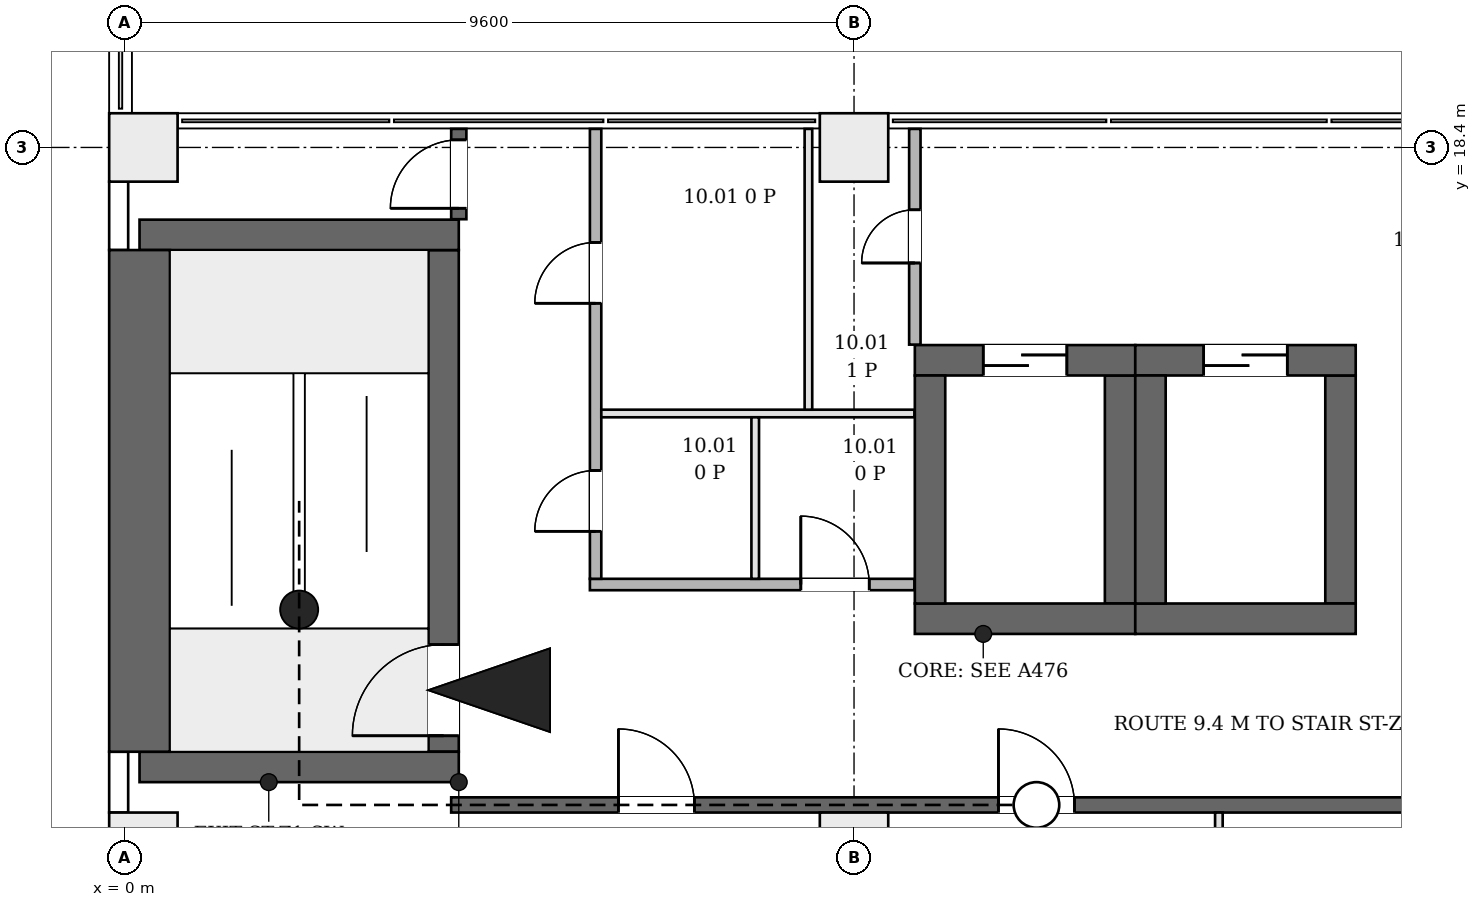
"""IFC4 building model, lengths in metres.
Left out: names, types, materials, properties, quantities, classifications, styles, units other than length and angle.
Written with IfcOpenShell. Run it as: python <this file> out.ifc"""

import sys

from ifc_helpers import new_model, si_unit, direction, frame, frame_2d, origin, origin_2d, place, context, subcontext, project, spatial, rectangle, extrude, element, fill, save


model = new_model("IFC4")
c1 = context("Model", 3, precision=1e-05, world=origin(), true_north=direction((0.0, 1.0)))
c2 = subcontext(c1, "Body", "Model", "MODEL_VIEW")
j1 = project(units=[si_unit("LENGTHUNIT", "METRE"), si_unit("PLANEANGLEUNIT", "RADIAN")], contexts=[c1])
p1 = place(None, origin())
s1 = spatial("IfcSite", under=j1, at=p1, CompositionType="ELEMENT")
p2 = place(p1, origin())
s2 = spatial("IfcBuilding", under=s1, at=p2, CompositionType="ELEMENT")
p3 = place(p2, frame((0.0, 0.0, 52.9)))
s3 = spatial("IfcBuildingStorey", under=s2, at=p3, CompositionType="ELEMENT", Elevation=52.9)
for number, where, z_axis, x_axis in (
    (1, (0.2, 10.25, 0.0), (0.0, 0.0, 1.0), (1.0, 0.0, 0.0)),
    (2, (0.2, 17.25, 0.0), (0.0, 0.0, 1.0), (1.0, 0.0, 0.0)),
):
    element("IfcWall", number, at=place(p3, frame(where, z_axis=z_axis, x_axis=x_axis)), inside=s3, PredefinedType="SHEAR", context=c2, shape_type="SweptSolid", body=[
        extrude(rectangle(XDim=4.2, YDim=0.4, at=frame_2d((2.1, 0.0))), origin(), (0.0, 0.0, 1.0), 4.2),
    ])
p4 = place(p3, frame((0.2, 10.45, 0.0), z_axis=(0.0, 0.0, 1.0), x_axis=(0.0, 1.0, 0.0)))
e3 = element("IfcWall", 3, at=p4, inside=s3, PredefinedType="SHEAR", context=c2, shape_type="SweptSolid", body=[
    extrude(rectangle(XDim=6.6, YDim=0.8, at=frame_2d((3.3, 0.0))), origin(), (0.0, 0.0, 1.0), 4.2),
])
p5 = place(p3, frame((4.2, 10.45, 0.0), z_axis=(0.0, 0.0, 1.0), x_axis=(0.0, 1.0, 0.0)))
e4 = element("IfcWall", 4, at=p5, inside=s3, PredefinedType="SHEAR", context=c2, shape_type="SweptSolid", body=[
    extrude(rectangle(XDim=6.6, YDim=0.4, at=frame_2d((3.3, 0.0))), origin(), (0.0, 0.0, 1.0), 4.2),
])
p6 = place(p5, frame((0.21, 0.0, 0.0)))
e5 = element("IfcOpeningElement", 5, at=p6, cuts=e4, PredefinedType="OPENING", context=c2, shape_type="SweptSolid", body=[
    extrude(rectangle(XDim=1.2, YDim=2.1, at=frame_2d((0.6, 1.05))), frame((0.0, 0.21, 0.0), z_axis=(0.0, -1.0, 0.0), x_axis=(1.0, 0.0, 0.0)), (0.0, 0.0, 1.0), 0.42),
])
p7 = place(p3, frame((10.4, 12.2, 0.0), z_axis=(0.0, 0.0, 1.0), x_axis=(1.0, 0.0, 0.0)))
e6 = element("IfcWall", 6, at=p7, inside=s3, PredefinedType="SHEAR", context=c2, shape_type="SweptSolid", body=[
    extrude(rectangle(XDim=2.9, YDim=0.4, at=frame_2d((1.45, 0.0))), origin(), (0.0, 0.0, 1.0), 4.2),
])
p8 = place(p3, frame((10.4, 15.6, 0.0), z_axis=(0.0, 0.0, 1.0), x_axis=(1.0, 0.0, 0.0)))
e7 = element("IfcWall", 7, at=p8, inside=s3, PredefinedType="SHEAR", context=c2, shape_type="SweptSolid", body=[
    extrude(rectangle(XDim=2.9, YDim=0.4, at=frame_2d((1.45, 0.0))), origin(), (0.0, 0.0, 1.0), 4.2),
])
p9 = place(p8, frame((0.9, 0.0, 0.0)))
e8 = element("IfcOpeningElement", 8, at=p9, cuts=e7, PredefinedType="OPENING", context=c2, shape_type="SweptSolid", body=[
    extrude(rectangle(XDim=1.1, YDim=2.1, at=frame_2d((0.55, 1.05))), frame((0.0, 0.21, 0.0), z_axis=(0.0, -1.0, 0.0), x_axis=(1.0, 0.0, 0.0)), (0.0, 0.0, 1.0), 0.42),
])
for number, where, z_axis, x_axis in (
    (9, (10.6, 12.4, 0.0), (0.0, 0.0, 1.0), (0.0, 1.0, 0.0)),
    (10, (13.1, 12.4, 0.0), (0.0, 0.0, 1.0), (0.0, 1.0, 0.0)),
):
    element("IfcWall", number, at=place(p3, frame(where, z_axis=z_axis, x_axis=x_axis)), inside=s3, PredefinedType="SHEAR", context=c2, shape_type="SweptSolid", body=[
        extrude(rectangle(XDim=3.0, YDim=0.4, at=frame_2d((1.5, 0.0))), origin(), (0.0, 0.0, 1.0), 4.2),
    ])
p10 = place(p3, frame((13.3, 12.2, 0.0), z_axis=(0.0, 0.0, 1.0), x_axis=(1.0, 0.0, 0.0)))
e11 = element("IfcWall", 11, at=p10, inside=s3, PredefinedType="SHEAR", context=c2, shape_type="SweptSolid", body=[
    extrude(rectangle(XDim=2.9, YDim=0.4, at=frame_2d((1.45, 0.0))), origin(), (0.0, 0.0, 1.0), 4.2),
])
p11 = place(p3, frame((13.3, 15.6, 0.0), z_axis=(0.0, 0.0, 1.0), x_axis=(1.0, 0.0, 0.0)))
e12 = element("IfcWall", 12, at=p11, inside=s3, PredefinedType="SHEAR", context=c2, shape_type="SweptSolid", body=[
    extrude(rectangle(XDim=2.9, YDim=0.4, at=frame_2d((1.45, 0.0))), origin(), (0.0, 0.0, 1.0), 4.2),
])
p12 = place(p11, frame((0.9, 0.0, 0.0)))
e13 = element("IfcOpeningElement", 13, at=p12, cuts=e12, PredefinedType="OPENING", context=c2, shape_type="SweptSolid", body=[
    extrude(rectangle(XDim=1.1, YDim=2.1, at=frame_2d((0.55, 1.05))), frame((0.0, 0.21, 0.0), z_axis=(0.0, -1.0, 0.0), x_axis=(1.0, 0.0, 0.0)), (0.0, 0.0, 1.0), 0.42),
])
for number, where, z_axis, x_axis in (
    (14, (13.5, 12.4, 0.0), (0.0, 0.0, 1.0), (0.0, 1.0, 0.0)),
    (15, (16.0, 12.4, 0.0), (0.0, 0.0, 1.0), (0.0, 1.0, 0.0)),
):
    element("IfcWall", number, at=place(p3, frame(where, z_axis=z_axis, x_axis=x_axis)), inside=s3, PredefinedType="SHEAR", context=c2, shape_type="SweptSolid", body=[
        extrude(rectangle(XDim=3.0, YDim=0.4, at=frame_2d((1.5, 0.0))), origin(), (0.0, 0.0, 1.0), 4.2),
    ])
for number, where, z_axis, x_axis in (
    (16, (0.25, 9.2, 0.0), (0.0, 0.0, 1.0), (1.0, 0.0, 0.0)),
    (17, (9.6, 9.2, 0.0), (0.0, 0.0, 1.0), (1.0, 0.0, 0.0)),
    (18, (0.25, 18.4, 0.0), (0.0, 0.0, 1.0), (1.0, 0.0, 0.0)),
    (19, (9.6, 18.4, 0.0), (0.0, 0.0, 1.0), (1.0, 0.0, 0.0)),
):
    element("IfcColumn", number, at=place(p3, frame(where, z_axis=z_axis, x_axis=x_axis)), inside=s3, PredefinedType="COLUMN", context=c2, shape_type="SweptSolid", body=[
        extrude(rectangle(XDim=0.9, YDim=0.9, at=origin_2d()), origin(), (0.0, 0.0, 1.0), 4.2),
    ])
p13 = place(p3, frame((-0.074, 10.45, 0.0), z_axis=(0.0, 0.0, 1.0), x_axis=(0.0, -1.0, 0.0)))
e20 = element("IfcWall", 20, at=p13, inside=s3, PredefinedType="ELEMENTEDWALL", context=c2, shape_type="SweptSolid", body=[
    extrude(rectangle(XDim=0.8, YDim=0.25, at=frame_2d((0.4, 0.0))), origin(), (0.0, 0.0, 1.0), 3.9),
])
p14 = place(p3, frame((-0.074, 17.95, 0.0), z_axis=(0.0, 0.0, 1.0), x_axis=(0.0, -1.0, 0.0)))
e21 = element("IfcWall", 21, at=p14, inside=s3, PredefinedType="ELEMENTEDWALL", context=c2, shape_type="SweptSolid", body=[
    extrude(rectangle(XDim=0.9, YDim=0.25, at=frame_2d((0.45, 0.0))), origin(), (0.0, 0.0, 1.0), 3.9),
])
p15 = place(p3, frame((4.3, 9.75, 0.0), z_axis=(0.0, 0.0, 1.0), x_axis=(1.0, 0.0, 0.0)))
e22 = element("IfcWall", 22, at=p15, inside=s3, PredefinedType="PARTITIONING", context=c2, shape_type="SweptSolid", body=[
    extrude(rectangle(XDim=43.894, YDim=0.2, at=frame_2d((21.947, 0.0))), origin(), (0.0, 0.0, 1.0), 3.9),
])
p16 = place(p15, frame((2.2, 0.0, 0.0)))
e23 = element("IfcOpeningElement", 23, at=p16, cuts=e22, PredefinedType="OPENING", context=c2, shape_type="SweptSolid", body=[
    extrude(rectangle(XDim=1.0, YDim=2.1, at=frame_2d((0.5, 1.05))), frame((0.0, 0.11, 0.0), z_axis=(0.0, -1.0, 0.0), x_axis=(1.0, 0.0, 0.0)), (0.0, 0.0, 1.0), 0.22),
])
p17 = place(p15, frame((7.2, 0.0, 0.0)))
e24 = element("IfcOpeningElement", 24, at=p17, cuts=e22, PredefinedType="OPENING", context=c2, shape_type="SweptSolid", body=[
    extrude(rectangle(XDim=1.0, YDim=2.1, at=frame_2d((0.5, 1.05))), frame((0.0, 0.11, 0.0), z_axis=(0.0, -1.0, 0.0), x_axis=(1.0, 0.0, 0.0)), (0.0, 0.0, 1.0), 0.22),
])
p18 = place(p15, frame((16.8, 0.0, 0.0)))
e25 = element("IfcOpeningElement", 25, at=p18, cuts=e22, PredefinedType="OPENING", context=c2, shape_type="SweptSolid", body=[
    extrude(rectangle(XDim=1.0, YDim=2.1, at=frame_2d((0.5, 1.05))), frame((0.0, 0.11, 0.0), z_axis=(0.0, -1.0, 0.0), x_axis=(1.0, 0.0, 0.0)), (0.0, 0.0, 1.0), 0.22),
])
p19 = place(p15, frame((28.8, 0.0, 0.0)))
e26 = element("IfcOpeningElement", 26, at=p19, cuts=e22, PredefinedType="OPENING", context=c2, shape_type="SweptSolid", body=[
    extrude(rectangle(XDim=1.0, YDim=2.1, at=frame_2d((0.5, 1.05))), frame((0.0, 0.11, 0.0), z_axis=(0.0, -1.0, 0.0), x_axis=(1.0, 0.0, 0.0)), (0.0, 0.0, 1.0), 0.22),
])
p20 = place(p15, frame((38.25, 0.0, 0.0)))
e27 = element("IfcOpeningElement", 27, at=p20, cuts=e22, PredefinedType="OPENING", context=c2, shape_type="SweptSolid", body=[
    extrude(rectangle(XDim=1.5, YDim=2.1, at=frame_2d((0.75, 1.05))), frame((0.0, 0.11, 0.0), z_axis=(0.0, -1.0, 0.0), x_axis=(1.0, 0.0, 0.0)), (0.0, 0.0, 1.0), 0.22),
])
p21 = place(p3, frame((4.4, 17.456, 0.0), z_axis=(0.0, 0.0, 1.0), x_axis=(0.0, 1.0, 0.0)))
e28 = element("IfcWall", 28, at=p21, inside=s3, PredefinedType="PARTITIONING", context=c2, shape_type="SweptSolid", body=[
    extrude(rectangle(XDim=1.188, YDim=0.2, at=frame_2d((0.594, 0.0))), origin(), (0.0, 0.0, 1.0), 3.9),
])
p22 = place(p21, frame((0.144, 0.0, 0.0)))
e29 = element("IfcOpeningElement", 29, at=p22, cuts=e28, PredefinedType="OPENING", context=c2, shape_type="SweptSolid", body=[
    extrude(rectangle(XDim=0.9, YDim=2.1, at=frame_2d((0.45, 1.05))), frame((0.0, 0.11, 0.0), z_axis=(0.0, -1.0, 0.0), x_axis=(1.0, 0.0, 0.0)), (0.0, 0.0, 1.0), 0.22),
])
p23 = place(p3, frame((6.125, 12.65, 0.0), z_axis=(0.0, 0.0, 1.0), x_axis=(1.0, 0.0, 0.0)))
e30 = element("IfcWall", 30, at=p23, inside=s3, PredefinedType="PARTITIONING", context=c2, shape_type="SweptSolid", body=[
    extrude(rectangle(XDim=4.269, YDim=0.15, at=frame_2d((2.135, 0.0))), origin(), (0.0, 0.0, 1.0), 3.9),
])
p24 = place(p23, frame((2.775, 0.0, 0.0)))
e31 = element("IfcOpeningElement", 31, at=p24, cuts=e30, PredefinedType="OPENING", context=c2, shape_type="SweptSolid", body=[
    extrude(rectangle(XDim=0.9, YDim=2.1, at=frame_2d((0.45, 1.05))), frame((0.0, 0.085, 0.0), z_axis=(0.0, -1.0, 0.0), x_axis=(1.0, 0.0, 0.0)), (0.0, 0.0, 1.0), 0.17),
])
p25 = place(p3, frame((6.2, 12.725, 0.0), z_axis=(0.0, 0.0, 1.0), x_axis=(0.0, 1.0, 0.0)))
e32 = element("IfcWall", 32, at=p25, inside=s3, PredefinedType="PARTITIONING", context=c2, shape_type="SweptSolid", body=[
    extrude(rectangle(XDim=5.919, YDim=0.15, at=frame_2d((2.959, 0.0))), origin(), (0.0, 0.0, 1.0), 3.9),
])
p26 = place(p25, frame((0.625, 0.0, 0.0)))
e33 = element("IfcOpeningElement", 33, at=p26, cuts=e32, PredefinedType="OPENING", context=c2, shape_type="SweptSolid", body=[
    extrude(rectangle(XDim=0.8, YDim=2.1, at=frame_2d((0.4, 1.05))), frame((0.0, 0.085, 0.0), z_axis=(0.0, -1.0, 0.0), x_axis=(1.0, 0.0, 0.0)), (0.0, 0.0, 1.0), 0.17),
])
p27 = place(p25, frame((3.625, 0.0, 0.0)))
e34 = element("IfcOpeningElement", 34, at=p27, cuts=e32, PredefinedType="OPENING", context=c2, shape_type="SweptSolid", body=[
    extrude(rectangle(XDim=0.8, YDim=2.1, at=frame_2d((0.4, 1.05))), frame((0.0, 0.085, 0.0), z_axis=(0.0, -1.0, 0.0), x_axis=(1.0, 0.0, 0.0)), (0.0, 0.0, 1.0), 0.17),
])
p28 = place(p3, frame((6.275, 14.9, 0.0), z_axis=(0.0, 0.0, 1.0), x_axis=(1.0, 0.0, 0.0)))
e35 = element("IfcWall", 35, at=p28, inside=s3, PredefinedType="PARTITIONING", context=c2, shape_type="SweptSolid", body=[
    extrude(rectangle(XDim=4.119, YDim=0.1, at=frame_2d((2.06, 0.0))), origin(), (0.0, 0.0, 1.0), 3.9),
])
p29 = place(p3, frame((8.3, 12.725, 0.0), z_axis=(0.0, 0.0, 1.0), x_axis=(0.0, 1.0, 0.0)))
e36 = element("IfcWall", 36, at=p29, inside=s3, PredefinedType="PARTITIONING", context=c2, shape_type="SweptSolid", body=[
    extrude(rectangle(XDim=2.125, YDim=0.1, at=frame_2d((1.062, 0.0))), origin(), (0.0, 0.0, 1.0), 3.9),
])
p30 = place(p3, frame((9.0, 14.95, 0.0), z_axis=(0.0, 0.0, 1.0), x_axis=(0.0, 1.0, 0.0)))
e37 = element("IfcWall", 37, at=p30, inside=s3, PredefinedType="PARTITIONING", context=c2, shape_type="SweptSolid", body=[
    extrude(rectangle(XDim=3.694, YDim=0.1, at=frame_2d((1.847, 0.0))), origin(), (0.0, 0.0, 1.0), 3.9),
])
p31 = place(p3, frame((10.4, 15.806, 0.0), z_axis=(0.0, 0.0, 1.0), x_axis=(0.0, 1.0, 0.0)))
e38 = element("IfcWall", 38, at=p31, inside=s3, PredefinedType="PARTITIONING", context=c2, shape_type="SweptSolid", body=[
    extrude(rectangle(XDim=2.838, YDim=0.15, at=frame_2d((1.419, 0.0))), origin(), (0.0, 0.0, 1.0), 3.9),
])
p32 = place(p31, frame((1.074, 0.0, 0.0)))
e39 = element("IfcOpeningElement", 39, at=p32, cuts=e38, PredefinedType="OPENING", context=c2, shape_type="SweptSolid", body=[
    extrude(rectangle(XDim=0.7, YDim=2.1, at=frame_2d((0.35, 1.05))), frame((0.0, 0.085, 0.0), z_axis=(0.0, -1.0, 0.0), x_axis=(1.0, 0.0, 0.0)), (0.0, 0.0, 1.0), 0.17),
])
p33 = place(p3, frame((14.4, 0.006, 0.0), z_axis=(0.0, 0.0, 1.0), x_axis=(0.0, 1.0, 0.0)))
e40 = element("IfcWall", 40, at=p33, inside=s3, PredefinedType="PARTITIONING", context=c2, shape_type="SweptSolid", body=[
    extrude(rectangle(XDim=9.644, YDim=0.1, at=frame_2d((4.822, 0.0))), origin(), (0.0, 0.0, 1.0), 3.9),
])
p34 = place(p6, origin())
e41 = element("IfcDoor", 41, at=p34, inside=s3, OperationType="SINGLE_SWING_RIGHT", PredefinedType="DOOR", context=c2, shape_type="SweptSolid", body=[
    extrude(rectangle(XDim=1.2, YDim=2.1, at=frame_2d((0.6, 1.05))), frame((0.0, 0.025, 0.0), z_axis=(0.0, -1.0, 0.0), x_axis=(1.0, 0.0, 0.0)), (0.0, 0.0, 1.0), 0.05),
])
fill(e5, e41)
p35 = place(p9, origin())
e42 = element("IfcDoor", 42, at=p35, inside=s3, OperationType="DOUBLE_DOOR_SLIDING", PredefinedType="DOOR", context=c2, shape_type="SweptSolid", body=[
    extrude(rectangle(XDim=1.1, YDim=2.1, at=frame_2d((0.55, 1.05))), frame((0.0, 0.025, 0.0), z_axis=(0.0, -1.0, 0.0), x_axis=(1.0, 0.0, 0.0)), (0.0, 0.0, 1.0), 0.05),
])
fill(e8, e42)
p36 = place(p12, origin())
e43 = element("IfcDoor", 43, at=p36, inside=s3, OperationType="DOUBLE_DOOR_SLIDING", PredefinedType="DOOR", context=c2, shape_type="SweptSolid", body=[
    extrude(rectangle(XDim=1.1, YDim=2.1, at=frame_2d((0.55, 1.05))), frame((0.0, 0.025, 0.0), z_axis=(0.0, -1.0, 0.0), x_axis=(1.0, 0.0, 0.0)), (0.0, 0.0, 1.0), 0.05),
])
fill(e13, e43)
p37 = place(p22, origin())
e44 = element("IfcDoor", 44, at=p37, inside=s3, OperationType="SINGLE_SWING_LEFT", PredefinedType="DOOR", context=c2, shape_type="SweptSolid", body=[
    extrude(rectangle(XDim=0.9, YDim=2.1, at=frame_2d((0.45, 1.05))), frame((0.0, 0.025, 0.0), z_axis=(0.0, -1.0, 0.0), x_axis=(1.0, 0.0, 0.0)), (0.0, 0.0, 1.0), 0.05),
])
fill(e29, e44)
p38 = place(p26, origin())
e45 = element("IfcDoor", 45, at=p38, inside=s3, OperationType="SINGLE_SWING_LEFT", PredefinedType="DOOR", context=c2, shape_type="SweptSolid", body=[
    extrude(rectangle(XDim=0.8, YDim=2.1, at=frame_2d((0.4, 1.05))), frame((0.0, 0.025, 0.0), z_axis=(0.0, -1.0, 0.0), x_axis=(1.0, 0.0, 0.0)), (0.0, 0.0, 1.0), 0.05),
])
fill(e33, e45)
p39 = place(p24, origin())
e46 = element("IfcDoor", 46, at=p39, inside=s3, OperationType="SINGLE_SWING_RIGHT", PredefinedType="DOOR", context=c2, shape_type="SweptSolid", body=[
    extrude(rectangle(XDim=0.9, YDim=2.1, at=frame_2d((0.45, 1.05))), frame((0.0, 0.025, 0.0), z_axis=(0.0, -1.0, 0.0), x_axis=(1.0, 0.0, 0.0)), (0.0, 0.0, 1.0), 0.05),
])
fill(e31, e46)
p40 = place(p27, origin())
e47 = element("IfcDoor", 47, at=p40, inside=s3, OperationType="SINGLE_SWING_LEFT", PredefinedType="DOOR", context=c2, shape_type="SweptSolid", body=[
    extrude(rectangle(XDim=0.8, YDim=2.1, at=frame_2d((0.4, 1.05))), frame((0.0, 0.025, 0.0), z_axis=(0.0, -1.0, 0.0), x_axis=(1.0, 0.0, 0.0)), (0.0, 0.0, 1.0), 0.05),
])
fill(e34, e47)
p41 = place(p32, origin())
e48 = element("IfcDoor", 48, at=p41, inside=s3, OperationType="SINGLE_SWING_LEFT", PredefinedType="DOOR", context=c2, shape_type="SweptSolid", body=[
    extrude(rectangle(XDim=0.7, YDim=2.1, at=frame_2d((0.35, 1.05))), frame((0.0, 0.025, 0.0), z_axis=(0.0, -1.0, 0.0), x_axis=(1.0, 0.0, 0.0)), (0.0, 0.0, 1.0), 0.05),
])
fill(e39, e48)
p42 = place(p16, origin())
e49 = element("IfcDoor", 49, at=p42, inside=s3, OperationType="SINGLE_SWING_RIGHT", PredefinedType="DOOR", context=c2, shape_type="SweptSolid", body=[
    extrude(rectangle(XDim=1.0, YDim=2.1, at=frame_2d((0.5, 1.05))), frame((0.0, 0.025, 0.0), z_axis=(0.0, -1.0, 0.0), x_axis=(1.0, 0.0, 0.0)), (0.0, 0.0, 1.0), 0.05),
])
fill(e23, e49)
p43 = place(p17, origin())
e50 = element("IfcDoor", 50, at=p43, inside=s3, OperationType="SINGLE_SWING_LEFT", PredefinedType="DOOR", context=c2, shape_type="SweptSolid", body=[
    extrude(rectangle(XDim=1.0, YDim=2.1, at=frame_2d((0.5, 1.05))), frame((0.0, 0.025, 0.0), z_axis=(0.0, -1.0, 0.0), x_axis=(1.0, 0.0, 0.0)), (0.0, 0.0, 1.0), 0.05),
])
fill(e24, e50)
save(model, sys.argv[1])
